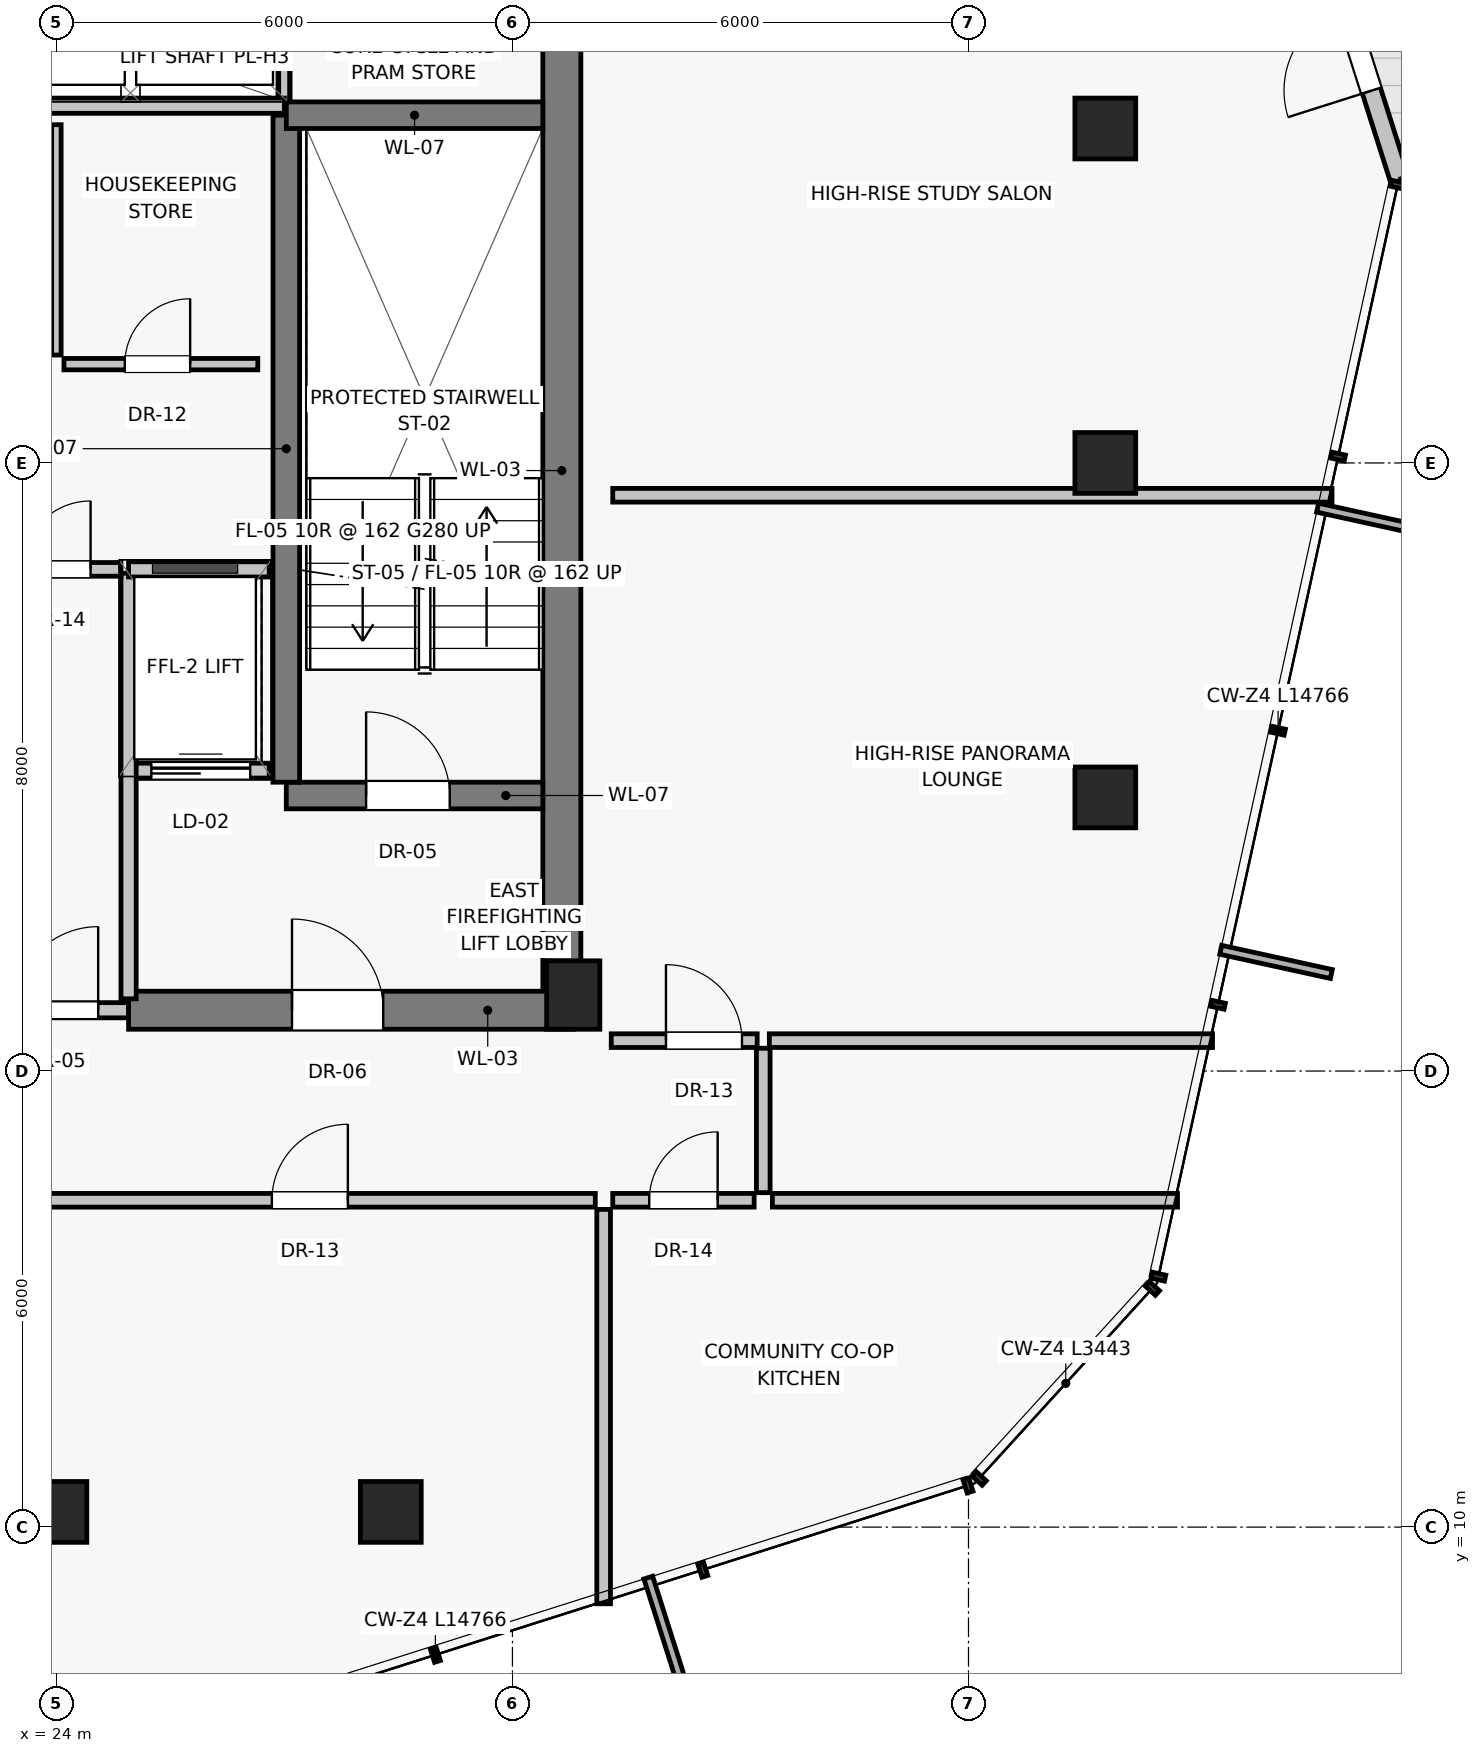
"""IFC4 building model, lengths in metres.
Left out: names, types, materials, properties, quantities, classifications, styles, units other than length and angle.
Written with IfcOpenShell. Run it as: python <this file> out.ifc"""

import sys

from ifc_helpers import new_model, si_unit, direction, frame, frame_2d, origin, origin_2d, place, context, subcontext, project, spatial, rectangle, extrude, source, transform, mapped, element, fill, save


model = new_model("IFC4")
c1 = context("Model", 3, precision=1e-05, world=origin(), true_north=direction((0.0, 1.0)))
c2 = subcontext(c1, "Body", "Model", "MODEL_VIEW")
j1 = project(units=[si_unit("LENGTHUNIT", "METRE"), si_unit("PLANEANGLEUNIT", "RADIAN")], contexts=[c1])
p1 = place(None, origin())
s1 = spatial("IfcSite", under=j1, at=p1, CompositionType="ELEMENT")
p2 = place(p1, origin())
s2 = spatial("IfcBuilding", under=s1, at=p2, CompositionType="ELEMENT")
p3 = place(p2, frame((0.0, 0.0, 251.25)))
s3 = spatial("IfcBuildingStorey", under=s2, at=p3, CompositionType="ELEMENT", Elevation=251.25)
p4 = place(p3, frame((30.8, 17.0, 0.0), z_axis=(0.0, 0.0, 1.0), x_axis=(1.0, 0.0, 0.0)))
e1 = element("IfcColumn", 1, at=p4, inside=s3, PredefinedType="PILASTER", context=c2, shape_type="SweptSolid", body=[
    extrude(rectangle(XDim=0.7, YDim=0.9, at=origin_2d()), origin(), (0.0, 0.0, 1.0), 3.25),
])
for number, where, z_axis, x_axis in (
    (2, (37.8, 19.6, 0.0), (0.0, 0.0, 1.0), (1.0, 0.0, 0.0)),
    (3, (37.8, 24.0, 0.0), (0.0, 0.0, 1.0), (1.0, 0.0, 0.0)),
    (4, (37.8, 28.4, 0.0), (0.0, 0.0, 1.0), (1.0, 0.0, 0.0)),
    (5, (24.0, 10.2, 0.0), (0.0, 0.0, 1.0), (1.0, 0.0, 0.0)),
    (6, (28.4, 10.2, 0.0), (0.0, 0.0, 1.0), (1.0, 0.0, 0.0)),
):
    element("IfcColumn", number, at=place(p3, frame(where, z_axis=z_axis, x_axis=x_axis)), inside=s3, PredefinedType="COLUMN", context=c2, shape_type="SweptSolid", body=[
        extrude(rectangle(XDim=0.8, YDim=0.8, at=origin_2d()), origin(), (0.0, 0.0, 1.0), 3.25),
    ])
p5 = place(p3, frame((41.678, 27.71, 0.0), z_axis=(0.0, 0.0, 1.0), x_axis=(-0.303026591546, 0.952982100995, 0.0)))
e7 = element("IfcWall", 7, at=p5, inside=s3, PredefinedType="SOLIDWALL", context=c2, shape_type="SweptSolid", body=[
    extrude(rectangle(XDim=3.642, YDim=0.25, at=frame_2d((1.821, 0.0))), origin(), (0.0, 0.0, 1.0), 3.015),
])
p6 = place(p5, frame((1.246, 0.0, 0.0)))
e8 = element("IfcOpeningElement", 8, at=p6, cuts=e7, PredefinedType="OPENING", context=c2, shape_type="SweptSolid", body=[
    extrude(rectangle(XDim=1.15, YDim=2.25, at=frame_2d((0.575, 1.125))), frame((0.0, 0.135, 0.0), z_axis=(0.0, -1.0, 0.0), x_axis=(1.0, 0.0, 0.0)), (0.0, 0.0, 1.0), 0.27),
])
p7 = place(p3, frame((30.65, 16.8, 0.0), z_axis=(0.0, 0.0, 1.0), x_axis=(0.0, 1.0, 0.0)))
e9 = element("IfcWall", 9, at=p7, inside=s3, PredefinedType="SHEAR", context=c2, shape_type="SweptSolid", body=[
    extrude(rectangle(XDim=14.2, YDim=0.5, at=frame_2d((7.1, 0.0))), origin(), (0.0, 0.0, 1.0), 3.015),
])
p8 = place(p3, frame((23.05, 16.8, 0.0), z_axis=(0.0, 0.0, 1.0), x_axis=(1.0, 0.0, 0.0)))
e10 = element("IfcWall", 10, at=p8, inside=s3, PredefinedType="SOLIDWALL", context=c2, shape_type="SweptSolid", body=[
    extrude(rectangle(XDim=1.9, YDim=0.2, at=frame_2d((0.95, 0.0))), origin(), (0.0, 0.0, 1.0), 2.165),
])
p9 = place(p8, frame((0.4, 0.0, 0.0)))
e11 = element("IfcOpeningElement", 11, at=p9, cuts=e10, PredefinedType="OPENING", context=c2, shape_type="SweptSolid", body=[
    extrude(rectangle(XDim=1.1, YDim=2.03, at=frame_2d((0.55, 1.015))), frame((0.0, 0.11, 0.0), z_axis=(0.0, -1.0, 0.0), x_axis=(1.0, 0.0, 0.0)), (0.0, 0.0, 1.0), 0.22),
])
p10 = place(p3, frame((24.95, 16.8, 0.0), z_axis=(0.0, 0.0, 1.0), x_axis=(1.0, 0.0, 0.0)))
e12 = element("IfcWall", 12, at=p10, inside=s3, PredefinedType="SHEAR", context=c2, shape_type="SweptSolid", body=[
    extrude(rectangle(XDim=5.85, YDim=0.5, at=frame_2d((2.925, 0.0))), origin(), (0.0, 0.0, 1.0), 3.015),
])
p11 = place(p10, frame((2.15, 0.0, 0.0)))
e13 = element("IfcOpeningElement", 13, at=p11, cuts=e12, PredefinedType="OPENING", context=c2, shape_type="SweptSolid", body=[
    extrude(rectangle(XDim=1.2, YDim=2.03, at=frame_2d((0.6, 1.015))), frame((0.0, 0.26, 0.0), z_axis=(0.0, -1.0, 0.0), x_axis=(1.0, 0.0, 0.0)), (0.0, 0.0, 1.0), 0.52),
])
p12 = place(p3, frame((27.0, 28.65, 0.0), z_axis=(0.0, 0.0, 1.0), x_axis=(0.0, 1.0, 0.0)))
e14 = element("IfcWall", 14, at=p12, inside=s3, PredefinedType="PARTITIONING", context=c2, shape_type="SweptSolid", body=[
    extrude(rectangle(XDim=2.2, YDim=0.15, at=frame_2d((1.1, 0.0))), origin(), (0.0, 0.0, 1.0), 3.015),
])
p13 = place(p3, frame((24.95, 19.95, 0.0), z_axis=(0.0, 0.0, 1.0), x_axis=(1.0, 0.0, 0.0)))
e15 = element("IfcWall", 15, at=p13, inside=s3, PredefinedType="SOLIDWALL", context=c2, shape_type="SweptSolid", body=[
    extrude(rectangle(XDim=1.85, YDim=0.2, at=frame_2d((0.925, 0.0))), origin(), (0.0, 0.0, 1.0), 3.015),
])
p14 = place(p13, frame((0.3, 0.0, 0.0)))
e16 = element("IfcOpeningElement", 16, at=p14, cuts=e15, PredefinedType="OPENING", context=c2, shape_type="SweptSolid", body=[
    extrude(rectangle(XDim=1.3, YDim=2.25, at=frame_2d((0.65, 1.125))), frame((0.0, 0.11, 0.0), z_axis=(0.0, -1.0, 0.0), x_axis=(1.0, 0.0, 0.0)), (0.0, 0.0, 1.0), 0.22),
])
p15 = place(p3, frame((27.025, 19.625, 0.0), z_axis=(0.0, 0.0, 1.0), x_axis=(1.0, 0.0, 0.0)))
e17 = element("IfcWall", 17, at=p15, inside=s3, PredefinedType="SHEAR", context=c2, shape_type="SweptSolid", body=[
    extrude(rectangle(XDim=3.375, YDim=0.35, at=frame_2d((1.688, 0.0))), origin(), (0.0, 0.0, 1.0), 3.015),
])
p16 = place(p15, frame((1.05, 0.0, 0.0)))
e18 = element("IfcOpeningElement", 18, at=p16, cuts=e17, PredefinedType="OPENING", context=c2, shape_type="SweptSolid", body=[
    extrude(rectangle(XDim=1.1, YDim=2.03, at=frame_2d((0.55, 1.015))), frame((0.0, 0.185, 0.0), z_axis=(0.0, -1.0, 0.0), x_axis=(1.0, 0.0, 0.0)), (0.0, 0.0, 1.0), 0.37),
])
p17 = place(p3, frame((27.025, 19.8, 0.0), z_axis=(0.0, 0.0, 1.0), x_axis=(0.0, 1.0, 0.0)))
e19 = element("IfcWall", 19, at=p17, inside=s3, PredefinedType="SHEAR", context=c2, shape_type="SweptSolid", body=[
    extrude(rectangle(XDim=8.775, YDim=0.35, at=frame_2d((4.387, 0.0))), origin(), (0.0, 0.0, 1.0), 3.015),
])
p18 = place(p3, frame((27.025, 28.575, 0.0), z_axis=(0.0, 0.0, 1.0), x_axis=(1.0, 0.0, 0.0)))
e20 = element("IfcWall", 20, at=p18, inside=s3, PredefinedType="SHEAR", context=c2, shape_type="SweptSolid", body=[
    extrude(rectangle(XDim=3.375, YDim=0.35, at=frame_2d((1.688, 0.0))), origin(), (0.0, 0.0, 1.0), 3.015),
])
p19 = place(p3, frame((24.95, 16.95, 0.0), z_axis=(0.0, 0.0, 1.0), x_axis=(0.0, 1.0, 0.0)))
e21 = element("IfcWall", 21, at=p19, inside=s3, PredefinedType="SOLIDWALL", context=c2, shape_type="SweptSolid", body=[
    extrude(rectangle(XDim=5.6, YDim=0.2, at=frame_2d((2.8, 0.0))), origin(), (0.0, 0.0, 1.0), 3.015),
])
p20 = place(p3, frame((24.95, 22.6, 0.0), z_axis=(0.0, 0.0, 1.0), x_axis=(1.0, 0.0, 0.0)))
e22 = element("IfcWall", 22, at=p20, inside=s3, PredefinedType="SOLIDWALL", context=c2, shape_type="SweptSolid", body=[
    extrude(rectangle(XDim=1.85, YDim=0.2, at=frame_2d((0.925, 0.0))), origin(), (0.0, 0.0, 1.0), 3.015),
])
p21 = place(p3, frame((21.0, 28.7, 0.0), z_axis=(0.0, 0.0, 1.0), x_axis=(1.0, 0.0, 0.0)))
e23 = element("IfcWall", 23, at=p21, inside=s3, PredefinedType="SOLIDWALL", context=c2, shape_type="SweptSolid", body=[
    extrude(rectangle(XDim=6.0, YDim=0.2, at=frame_2d((3.0, 0.0))), origin(), (0.0, 0.0, 1.0), 3.015),
])
p22 = place(p3, frame((23.15, 22.6, 0.0), z_axis=(0.0, 0.0, 1.0), x_axis=(1.0, 0.0, 0.0)))
e24 = element("IfcWall", 24, at=p22, inside=s3, PredefinedType="PARTITIONING", context=c2, shape_type="SweptSolid", body=[
    extrude(rectangle(XDim=1.7, YDim=0.18, at=frame_2d((0.85, 0.0))), origin(), (0.0, 0.0, 1.0), 3.015),
])
p23 = place(p22, frame((0.4, 0.0, 0.0)))
e25 = element("IfcOpeningElement", 25, at=p23, cuts=e24, PredefinedType="OPENING", context=c2, shape_type="SweptSolid", body=[
    extrude(rectangle(XDim=0.9, YDim=2.01, at=frame_2d((0.45, 1.005))), frame((0.0, 0.1, 0.0), z_axis=(0.0, -1.0, 0.0), x_axis=(1.0, 0.0, 0.0)), (0.0, 0.0, 1.0), 0.2),
])
p24 = place(p3, frame((24.1, 25.3, 0.0), z_axis=(0.0, 0.0, 1.0), x_axis=(1.0, 0.0, 0.0)))
e26 = element("IfcWall", 26, at=p24, inside=s3, PredefinedType="PARTITIONING", context=c2, shape_type="SweptSolid", body=[
    extrude(rectangle(XDim=2.55, YDim=0.15, at=frame_2d((1.275, 0.0))), origin(), (0.0, 0.0, 1.0), 3.015),
])
p25 = place(p24, frame((0.8, 0.0, 0.0)))
e27 = element("IfcOpeningElement", 27, at=p25, cuts=e26, PredefinedType="OPENING", context=c2, shape_type="SweptSolid", body=[
    extrude(rectangle(XDim=0.86, YDim=2.01, at=frame_2d((0.43, 1.005))), frame((0.0, 0.085, 0.0), z_axis=(0.0, -1.0, 0.0), x_axis=(1.0, 0.0, 0.0)), (0.0, 0.0, 1.0), 0.17),
])
p26 = place(p3, frame((24.0, 25.42, 0.0), z_axis=(0.0, 0.0, 1.0), x_axis=(0.0, 1.0, 0.0)))
e28 = element("IfcWall", 28, at=p26, inside=s3, PredefinedType="PARTITIONING", context=c2, shape_type="SweptSolid", body=[
    extrude(rectangle(XDim=3.03, YDim=0.125, at=frame_2d((1.515, 0.0))), origin(), (0.0, 0.0, 1.0), 3.015),
])
p27 = place(p3, frame((31.2, 14.18, 0.0), z_axis=(0.0, 0.0, 1.0), x_axis=(0.0, -1.0, 0.0)))
e29 = element("IfcWall", 29, at=p27, inside=s3, PredefinedType="PARTITIONING", context=c2, shape_type="SweptSolid", body=[
    extrude(rectangle(XDim=5.188, YDim=0.18, at=frame_2d((2.594, 0.0))), origin(), (0.0, 0.0, 1.0), 3.015),
])
p28 = place(p3, frame((23.58, 14.3, 0.0), z_axis=(0.0, 0.0, 1.0), x_axis=(1.0, 0.0, 0.0)))
e30 = element("IfcWall", 30, at=p28, inside=s3, PredefinedType="PARTITIONING", context=c2, shape_type="SweptSolid", body=[
    extrude(rectangle(XDim=7.51, YDim=0.18, at=frame_2d((3.755, 0.0))), origin(), (0.0, 0.0, 1.0), 3.015),
])
p29 = place(p28, frame((3.255, 0.0, 0.0)))
e31 = element("IfcOpeningElement", 31, at=p29, cuts=e30, PredefinedType="OPENING", context=c2, shape_type="SweptSolid", body=[
    extrude(rectangle(XDim=1.0, YDim=2.01, at=frame_2d((0.5, 1.005))), frame((0.0, 0.1, 0.0), z_axis=(0.0, -1.0, 0.0), x_axis=(1.0, 0.0, 0.0)), (0.0, 0.0, 1.0), 0.2),
])
p30 = place(p3, frame((31.32, 23.575, 0.0), z_axis=(0.0, 0.0, 1.0), x_axis=(1.0, 0.0, 0.0)))
e32 = element("IfcWall", 32, at=p30, inside=s3, PredefinedType="PARTITIONING", context=c2, shape_type="SweptSolid", body=[
    extrude(rectangle(XDim=9.462, YDim=0.18, at=frame_2d((4.731, 0.0))), origin(), (0.0, 0.0, 1.0), 3.015),
])
p31 = place(p3, frame((33.3, 14.4, 0.0), z_axis=(0.0, 0.0, 1.0), x_axis=(0.0, 1.0, 0.0)))
e33 = element("IfcWall", 33, at=p31, inside=s3, PredefinedType="PARTITIONING", context=c2, shape_type="SweptSolid", body=[
    extrude(rectangle(XDim=1.9, YDim=0.18, at=frame_2d((0.95, 0.0))), origin(), (0.0, 0.0, 1.0), 3.015),
])
p32 = place(p3, frame((31.3, 16.4, 0.0), z_axis=(0.0, 0.0, 1.0), x_axis=(1.0, 0.0, 0.0)))
e34 = element("IfcWall", 34, at=p32, inside=s3, PredefinedType="PARTITIONING", context=c2, shape_type="SweptSolid", body=[
    extrude(rectangle(XDim=1.92, YDim=0.18, at=frame_2d((0.96, 0.0))), origin(), (0.0, 0.0, 1.0), 3.015),
])
p33 = place(p32, frame((0.72, 0.0, 0.0)))
e35 = element("IfcOpeningElement", 35, at=p33, cuts=e34, PredefinedType="OPENING", context=c2, shape_type="SweptSolid", body=[
    extrude(rectangle(XDim=1.0, YDim=2.01, at=frame_2d((0.5, 1.005))), frame((0.0, 0.1, 0.0), z_axis=(0.0, -1.0, 0.0), x_axis=(1.0, 0.0, 0.0)), (0.0, 0.0, 1.0), 0.2),
])
p34 = place(p3, frame((33.38, 16.4, 0.0), z_axis=(0.0, 0.0, 1.0), x_axis=(1.0, 0.0, 0.0)))
e36 = element("IfcWall", 36, at=p34, inside=s3, PredefinedType="PARTITIONING", context=c2, shape_type="SweptSolid", body=[
    extrude(rectangle(XDim=5.83, YDim=0.18, at=frame_2d((2.915, 0.0))), origin(), (0.0, 0.0, 1.0), 3.015),
])
p35 = place(p3, frame((33.42, 14.3, 0.0), z_axis=(0.0, 0.0, 1.0), x_axis=(1.0, 0.0, 0.0)))
e37 = element("IfcWall", 37, at=p35, inside=s3, PredefinedType="PARTITIONING", context=c2, shape_type="SweptSolid", body=[
    extrude(rectangle(XDim=5.33, YDim=0.18, at=frame_2d((2.665, 0.0))), origin(), (0.0, 0.0, 1.0), 3.015),
])
p36 = place(p3, frame((31.32, 14.3, 0.0), z_axis=(0.0, 0.0, 1.0), x_axis=(1.0, 0.0, 0.0)))
e38 = element("IfcWall", 38, at=p36, inside=s3, PredefinedType="PARTITIONING", context=c2, shape_type="SweptSolid", body=[
    extrude(rectangle(XDim=1.86, YDim=0.18, at=frame_2d((0.93, 0.0))), origin(), (0.0, 0.0, 1.0), 3.015),
])
p37 = place(p36, frame((0.48, 0.0, 0.0)))
e39 = element("IfcOpeningElement", 39, at=p37, cuts=e38, PredefinedType="OPENING", context=c2, shape_type="SweptSolid", body=[
    extrude(rectangle(XDim=0.9, YDim=2.01, at=frame_2d((0.45, 1.005))), frame((0.0, 0.1, 0.0), z_axis=(0.0, -1.0, 0.0), x_axis=(1.0, 0.0, 0.0)), (0.0, 0.0, 1.0), 0.2),
])
m1 = source(origin(), c2, "Body", "SweptSolid", [
    extrude(rectangle(XDim=1.15, YDim=2.25, at=frame_2d((0.575, 1.125))), frame((0.0, 0.025, 0.0), z_axis=(0.0, -1.0, 0.0), x_axis=(1.0, 0.0, 0.0)), (0.0, 0.0, 1.0), 0.05),
])
p38 = place(p6, frame((1.15, 0.0, 0.0), z_axis=(0.0, 0.0, 1.0), x_axis=(-1.0, 0.0, 0.0)))
e40 = element("IfcDoor", 40, at=p38, inside=s3, OperationType="SINGLE_SWING_LEFT", PredefinedType="DOOR", context=c2, shape_type="MappedRepresentation", body=[
    mapped(m1, transform((0.0, 0.0, 0.0), scale=1.0)),
])
fill(e8, e40)
m2 = source(origin(), c2, "Body", "SweptSolid", [
    extrude(rectangle(XDim=1.1, YDim=2.03, at=frame_2d((0.55, 1.015))), frame((0.0, 0.025, 0.0), z_axis=(0.0, -1.0, 0.0), x_axis=(1.0, 0.0, 0.0)), (0.0, 0.0, 1.0), 0.05),
])
p39 = place(p9, origin())
e41 = element("IfcDoor", 41, at=p39, inside=s3, OperationType="SINGLE_SWING_RIGHT", PredefinedType="DOOR", context=c2, shape_type="MappedRepresentation", body=[
    mapped(m2, transform((0.0, 0.0, 0.0), scale=1.0)),
])
fill(e11, e41)
m3 = source(origin(), c2, "Body", "SweptSolid", [
    extrude(rectangle(XDim=1.2, YDim=2.03, at=frame_2d((0.6, 1.015))), frame((0.0, 0.025, 0.0), z_axis=(0.0, -1.0, 0.0), x_axis=(1.0, 0.0, 0.0)), (0.0, 0.0, 1.0), 0.05),
])
p40 = place(p11, origin())
e42 = element("IfcDoor", 42, at=p40, inside=s3, OperationType="SINGLE_SWING_LEFT", PredefinedType="DOOR", context=c2, shape_type="MappedRepresentation", body=[
    mapped(m3, transform((0.0, 0.0, 0.0), scale=1.0)),
])
fill(e13, e42)
m4 = source(origin(), c2, "Body", "SweptSolid", [
    extrude(rectangle(XDim=1.3, YDim=2.25, at=frame_2d((0.65, 1.125))), frame((0.0, 0.025, 0.0), z_axis=(0.0, -1.0, 0.0), x_axis=(1.0, 0.0, 0.0)), (0.0, 0.0, 1.0), 0.05),
])
p41 = place(p14, origin())
e43 = element("IfcDoor", 43, at=p41, inside=s3, OperationType="SLIDING_TO_LEFT", PredefinedType="DOOR", context=c2, shape_type="MappedRepresentation", body=[
    mapped(m4, transform((0.0, 0.0, 0.0), scale=1.0)),
])
fill(e16, e43)
p42 = place(p16, origin())
e44 = element("IfcDoor", 44, at=p42, inside=s3, OperationType="SINGLE_SWING_LEFT", PredefinedType="DOOR", context=c2, shape_type="MappedRepresentation", body=[
    mapped(m2, transform((0.0, 0.0, 0.0), scale=1.0)),
])
fill(e18, e44)
m5 = source(origin(), c2, "Body", "SweptSolid", [
    extrude(rectangle(XDim=0.9, YDim=2.01, at=frame_2d((0.45, 1.005))), frame((0.0, 0.025, 0.0), z_axis=(0.0, -1.0, 0.0), x_axis=(1.0, 0.0, 0.0)), (0.0, 0.0, 1.0), 0.05),
])
p43 = place(p23, origin())
e45 = element("IfcDoor", 45, at=p43, inside=s3, OperationType="SINGLE_SWING_RIGHT", PredefinedType="DOOR", context=c2, shape_type="MappedRepresentation", body=[
    mapped(m5, transform((0.0, 0.0, 0.0), scale=1.0)),
])
fill(e25, e45)
m6 = source(origin(), c2, "Body", "SweptSolid", [
    extrude(rectangle(XDim=0.86, YDim=2.01, at=frame_2d((0.43, 1.005))), frame((0.0, 0.025, 0.0), z_axis=(0.0, -1.0, 0.0), x_axis=(1.0, 0.0, 0.0)), (0.0, 0.0, 1.0), 0.05),
])
p44 = place(p25, origin())
e46 = element("IfcDoor", 46, at=p44, inside=s3, OperationType="SINGLE_SWING_RIGHT", PredefinedType="DOOR", context=c2, shape_type="MappedRepresentation", body=[
    mapped(m6, transform((0.0, 0.0, 0.0), scale=1.0)),
])
fill(e27, e46)
m7 = source(origin(), c2, "Body", "SweptSolid", [
    extrude(rectangle(XDim=1.0, YDim=2.01, at=frame_2d((0.5, 1.005))), frame((0.0, 0.025, 0.0), z_axis=(0.0, -1.0, 0.0), x_axis=(1.0, 0.0, 0.0)), (0.0, 0.0, 1.0), 0.05),
])
p45 = place(p29, origin())
e47 = element("IfcDoor", 47, at=p45, inside=s3, OperationType="SINGLE_SWING_RIGHT", PredefinedType="DOOR", context=c2, shape_type="MappedRepresentation", body=[
    mapped(m7, transform((0.0, 0.0, 0.0), scale=1.0)),
])
fill(e31, e47)
p46 = place(p33, origin())
e48 = element("IfcDoor", 48, at=p46, inside=s3, OperationType="SINGLE_SWING_LEFT", PredefinedType="DOOR", context=c2, shape_type="MappedRepresentation", body=[
    mapped(m7, transform((0.0, 0.0, 0.0), scale=1.0)),
])
fill(e35, e48)
p47 = place(p37, origin())
e49 = element("IfcDoor", 49, at=p47, inside=s3, OperationType="SINGLE_SWING_RIGHT", PredefinedType="DOOR", context=c2, shape_type="MappedRepresentation", body=[
    mapped(m5, transform((0.0, 0.0, 0.0), scale=1.0)),
])
fill(e39, e49)
save(model, sys.argv[1])
